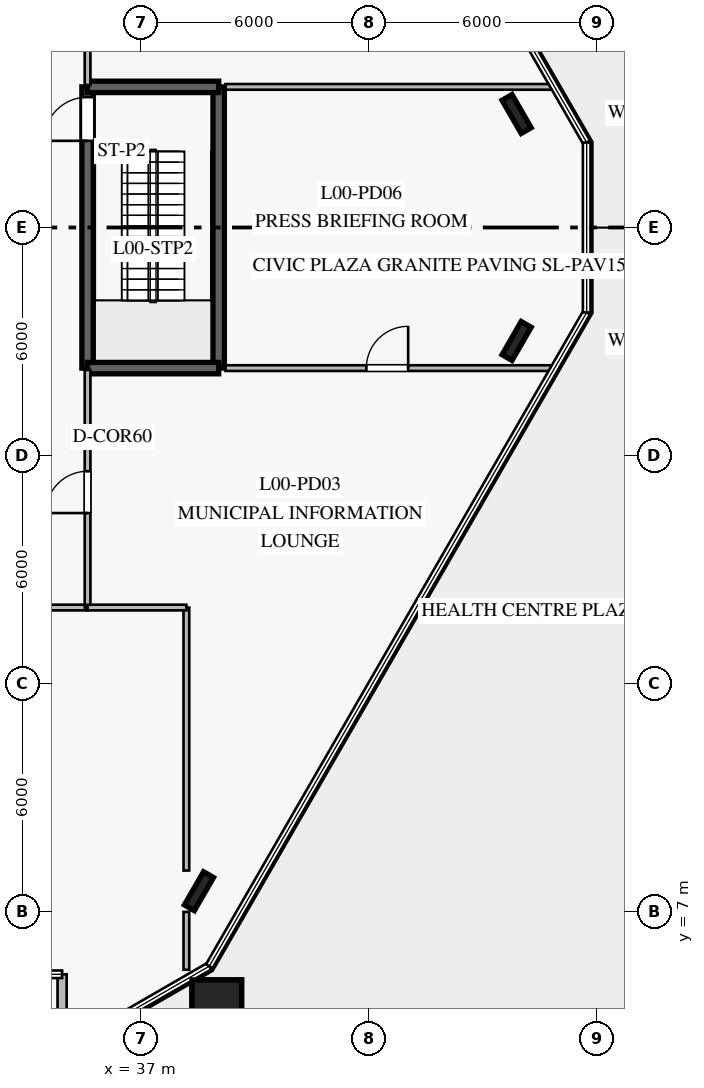
"""IFC4 building model, lengths in metres.
Left out: names, types, materials, properties, quantities, classifications, styles, units other than length and angle.
Written with IfcOpenShell. Run it as: python <this file> out.ifc"""

import sys

from ifc_helpers import new_model, si_unit, direction, frame, frame_2d, origin, origin_2d, place, context, subcontext, project, spatial, rectangle, i_section, extrude, element, fill, save


model = new_model("IFC4")
c1 = context("Model", 3, precision=1e-05, world=origin(), true_north=direction((0.0, 1.0)))
c2 = subcontext(c1, "Body", "Model", "MODEL_VIEW")
j1 = project(units=[si_unit("LENGTHUNIT", "METRE"), si_unit("PLANEANGLEUNIT", "RADIAN")], contexts=[c1])
p1 = place(None, origin())
s1 = spatial("IfcSite", under=j1, at=p1, CompositionType="ELEMENT")
p2 = place(p1, origin())
s2 = spatial("IfcBuilding", under=s1, at=p2, CompositionType="ELEMENT")
p3 = place(p2, origin())
s3 = spatial("IfcBuildingStorey", under=s2, at=p3, CompositionType="ELEMENT", Elevation=0.0)
p4 = place(p3, frame((35.6, 21.3, 0.0), z_axis=(0.0, 0.0, 1.0), x_axis=(0.0, 1.0, 0.0)))
e1 = element("IfcWall", 1, at=p4, inside=s3, PredefinedType="SOLIDWALL", context=c2, shape_type="SweptSolid", body=[
    extrude(rectangle(XDim=7.4, YDim=0.3, at=frame_2d((3.7, 0.0))), origin(), (0.0, 0.0, 1.0), 4.94),
])
p5 = place(p4, frame((5.98, 0.0, 0.0)))
e2 = element("IfcOpeningElement", 2, at=p5, cuts=e1, PredefinedType="OPENING", context=c2, shape_type="SweptSolid", body=[
    extrude(rectangle(XDim=1.15, YDim=2.2, at=frame_2d((0.575, 1.1))), frame((0.0, 0.16, 0.0), z_axis=(0.0, -1.0, 0.0), x_axis=(1.0, 0.0, 0.0)), (0.0, 0.0, 1.0), 0.32),
])
p6 = place(p3, frame((39.05, 21.3, 0.0), z_axis=(0.0, 0.0, 1.0), x_axis=(0.0, 1.0, 0.0)))
e3 = element("IfcWall", 3, at=p6, inside=s3, PredefinedType="SOLIDWALL", context=c2, shape_type="SweptSolid", body=[
    extrude(rectangle(XDim=7.4, YDim=0.3, at=frame_2d((3.7, 0.0))), origin(), (0.0, 0.0, 1.0), 4.94),
])
for number, where, z_axis, x_axis in (
    (4, (35.6, 21.3, 0.0), (0.0, 0.0, 1.0), (1.0, 0.0, 0.0)),
    (5, (35.6, 28.7, 0.0), (0.0, 0.0, 1.0), (1.0, 0.0, 0.0)),
):
    element("IfcWall", number, at=place(p3, frame(where, z_axis=z_axis, x_axis=x_axis)), inside=s3, PredefinedType="SOLIDWALL", context=c2, shape_type="SweptSolid", body=[
        extrude(rectangle(XDim=3.45, YDim=0.3, at=frame_2d((1.725, 0.0))), origin(), (0.0, 0.0, 1.0), 4.94),
    ])
for number, where, z_axis, x_axis in (
    (6, (46.89, 27.986, 0.0), (0.0, 0.0, 1.0), (-0.5, 0.866, 0.0)),
    (7, (38.531, 7.536, 0.0), (0.0, 0.0, 1.0), (0.5, 0.866, 0.0)),
    (8, (46.89, 22.014, 0.0), (0.0, 0.0, 1.0), (0.5, 0.866, 0.0)),
):
    element("IfcColumn", number, at=place(p3, frame(where, z_axis=z_axis, x_axis=x_axis)), inside=s3, PredefinedType="COLUMN", context=c2, shape_type="SweptSolid", body=[
        extrude(i_section(OverallWidth=0.302, OverallDepth=1.008, WebThickness=0.021, FlangeThickness=0.04, at=origin_2d()), origin(), (0.0, 0.0, 1.0), 5.2),
    ])
p7 = place(p3, frame((39.0, 4.55, 0.0), z_axis=(0.0, 0.0, 1.0), x_axis=(1.0, 0.0, 0.0)))
e9 = element("IfcColumn", 9, at=p7, inside=s3, PredefinedType="COLUMN", context=c2, shape_type="SweptSolid", body=[
    extrude(rectangle(XDim=1.3, YDim=1.3, at=origin_2d()), origin(), (0.0, 0.0, 1.0), 5.2),
])
p8 = place(p3, frame((34.93, 5.35, 0.0), z_axis=(0.0, 0.0, 1.0), x_axis=(0.0, -1.0, 0.0)))
e10 = element("IfcWall", 10, at=p8, inside=s3, PredefinedType="STANDARD", context=c2, shape_type="SweptSolid", body=[
    extrude(rectangle(XDim=2.023, YDim=0.24, at=frame_2d((1.012, 0.0))), origin(), (0.0, 0.0, 1.0), 4.94),
])
p9 = place(p3, frame((14.4, 15.0, 0.0), z_axis=(0.0, 0.0, 1.0), x_axis=(1.0, 0.0, 0.0)))
e11 = element("IfcWall", 11, at=p9, inside=s3, PredefinedType="PARTITIONING", context=c2, shape_type="SweptSolid", body=[
    extrude(rectangle(XDim=21.2, YDim=0.15, at=frame_2d((10.6, 0.0))), origin(), (0.0, 0.0, 1.0), 4.39),
])
p10 = place(p9, frame((9.5, 0.0, 0.0)))
e12 = element("IfcOpeningElement", 12, at=p10, cuts=e11, PredefinedType="OPENING", context=c2, shape_type="SweptSolid", body=[
    extrude(rectangle(XDim=2.2, YDim=2.4, at=frame_2d((1.1, 1.2))), frame((0.0, 0.085, 0.0), z_axis=(0.0, -1.0, 0.0), x_axis=(1.0, 0.0, 0.0)), (0.0, 0.0, 1.0), 0.17),
])
p11 = place(p3, frame((35.6, 15.0, 0.0), z_axis=(0.0, 0.0, 1.0), x_axis=(0.0, 1.0, 0.0)))
e13 = element("IfcWall", 13, at=p11, inside=s3, PredefinedType="PARTITIONING", context=c2, shape_type="SweptSolid", body=[
    extrude(rectangle(XDim=6.25, YDim=0.15, at=frame_2d((3.125, 0.0))), origin(), (0.0, 0.0, 1.0), 4.94),
])
p12 = place(p11, frame((2.486, 0.0, 0.0)))
e14 = element("IfcOpeningElement", 14, at=p12, cuts=e13, PredefinedType="OPENING", context=c2, shape_type="SweptSolid", body=[
    extrude(rectangle(XDim=1.1, YDim=2.2, at=frame_2d((0.55, 1.1))), frame((0.0, 0.085, 0.0), z_axis=(0.0, -1.0, 0.0), x_axis=(1.0, 0.0, 0.0)), (0.0, 0.0, 1.0), 0.17),
])
p13 = place(p3, frame((35.6, 28.75, 0.0), z_axis=(0.0, 0.0, 1.0), x_axis=(0.0, 1.0, 0.0)))
e15 = element("IfcWall", 15, at=p13, inside=s3, PredefinedType="PARTITIONING", context=c2, shape_type="SweptSolid", body=[
    extrude(rectangle(XDim=6.25, YDim=0.15, at=frame_2d((3.125, 0.0))), origin(), (0.0, 0.0, 1.0), 4.39),
])
p14 = place(p3, frame((38.2, 5.47, 0.0), z_axis=(0.0, 0.0, 1.0), x_axis=(0.0, 1.0, 0.0)))
e16 = element("IfcWall", 16, at=p14, inside=s3, PredefinedType="PARTITIONING", context=c2, shape_type="SweptSolid", body=[
    extrude(rectangle(XDim=1.522, YDim=0.15, at=frame_2d((0.761, 0.0))), origin(), (0.0, 0.0, 1.0), 4.39),
])
p15 = place(p3, frame((38.2, 8.08, 0.0), z_axis=(0.0, 0.0, 1.0), x_axis=(0.0, 1.0, 0.0)))
e17 = element("IfcWall", 17, at=p15, inside=s3, PredefinedType="PARTITIONING", context=c2, shape_type="SweptSolid", body=[
    extrude(rectangle(XDim=6.92, YDim=0.15, at=frame_2d((3.46, 0.0))), origin(), (0.0, 0.0, 1.0), 4.39),
])
p16 = place(p3, frame((35.6, 15.0, 0.0), z_axis=(0.0, 0.0, 1.0), x_axis=(1.0, 0.0, 0.0)))
e18 = element("IfcWall", 18, at=p16, inside=s3, PredefinedType="PARTITIONING", context=c2, shape_type="SweptSolid", body=[
    extrude(rectangle(XDim=2.6, YDim=0.15, at=frame_2d((1.3, 0.0))), origin(), (0.0, 0.0, 1.0), 4.94),
])
p17 = place(p3, frame((39.23, 21.3, 0.0), z_axis=(0.0, 0.0, 1.0), x_axis=(1.0, 0.0, 0.0)))
e19 = element("IfcWall", 19, at=p17, inside=s3, PredefinedType="PARTITIONING", context=c2, shape_type="SweptSolid", body=[
    extrude(rectangle(XDim=8.69, YDim=0.15, at=frame_2d((4.345, 0.0))), origin(), (0.0, 0.0, 1.0), 4.24),
])
p18 = place(p17, frame((3.706, 0.0, 0.0)))
e20 = element("IfcOpeningElement", 20, at=p18, cuts=e19, PredefinedType="OPENING", context=c2, shape_type="SweptSolid", body=[
    extrude(rectangle(XDim=1.1, YDim=2.2, at=frame_2d((0.55, 1.1))), frame((0.0, 0.085, 0.0), z_axis=(0.0, -1.0, 0.0), x_axis=(1.0, 0.0, 0.0)), (0.0, 0.0, 1.0), 0.17),
])
p19 = place(p3, frame((39.23, 28.7, 0.0), z_axis=(0.0, 0.0, 1.0), x_axis=(1.0, 0.0, 0.0)))
e21 = element("IfcWall", 21, at=p19, inside=s3, PredefinedType="PARTITIONING", context=c2, shape_type="SweptSolid", body=[
    extrude(rectangle(XDim=8.69, YDim=0.15, at=frame_2d((4.345, 0.0))), origin(), (0.0, 0.0, 1.0), 4.24),
])
p20 = place(p5, origin())
e22 = element("IfcDoor", 22, at=p20, inside=s3, OperationType="SINGLE_SWING_LEFT", PredefinedType="DOOR", context=c2, shape_type="SweptSolid", body=[
    extrude(rectangle(XDim=1.15, YDim=2.2, at=frame_2d((0.575, 1.1))), frame((0.0, 0.025, 0.0), z_axis=(0.0, -1.0, 0.0), x_axis=(1.0, 0.0, 0.0)), (0.0, 0.0, 1.0), 0.05),
])
fill(e2, e22)
p21 = place(p12, origin())
e23 = element("IfcDoor", 23, at=p21, inside=s3, OperationType="SINGLE_SWING_LEFT", PredefinedType="DOOR", context=c2, shape_type="SweptSolid", body=[
    extrude(rectangle(XDim=1.1, YDim=2.2, at=frame_2d((0.55, 1.1))), frame((0.0, 0.025, 0.0), z_axis=(0.0, -1.0, 0.0), x_axis=(1.0, 0.0, 0.0)), (0.0, 0.0, 1.0), 0.05),
])
fill(e14, e23)
p22 = place(p18, origin())
e24 = element("IfcDoor", 24, at=p22, inside=s3, OperationType="SINGLE_SWING_RIGHT", PredefinedType="DOOR", context=c2, shape_type="SweptSolid", body=[
    extrude(rectangle(XDim=1.1, YDim=2.2, at=frame_2d((0.55, 1.1))), frame((0.0, 0.025, 0.0), z_axis=(0.0, -1.0, 0.0), x_axis=(1.0, 0.0, 0.0)), (0.0, 0.0, 1.0), 0.05),
])
fill(e20, e24)
save(model, sys.argv[1])
